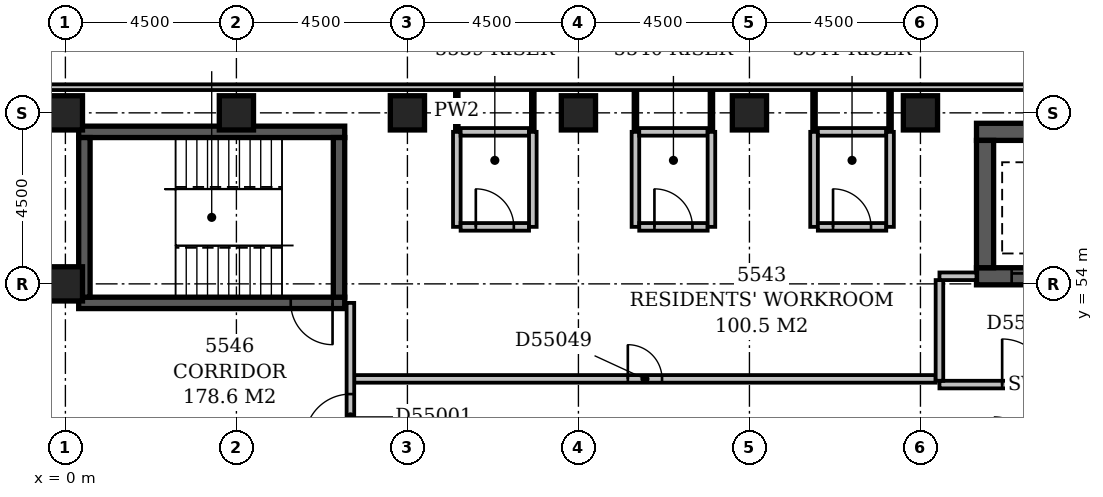
"""IFC4 building model, lengths in metres.
Left out: names, types, materials, properties, quantities, classifications, styles, units other than length and angle.
Written with IfcOpenShell. Run it as: python <this file> out.ifc"""

import sys

from ifc_helpers import new_model, si_unit, direction, frame, frame_2d, origin, origin_2d, place, context, subcontext, project, spatial, rectangle, extrude, element, fill, save


model = new_model("IFC4")
c1 = context("Model", 3, precision=1e-05, world=origin(), true_north=direction((0.0, 1.0)))
c2 = subcontext(c1, "Body", "Model", "MODEL_VIEW")
j1 = project(units=[si_unit("LENGTHUNIT", "METRE"), si_unit("PLANEANGLEUNIT", "RADIAN")], contexts=[c1])
p1 = place(None, origin())
s1 = spatial("IfcSite", under=j1, at=p1, CompositionType="ELEMENT")
p2 = place(p1, origin())
s2 = spatial("IfcBuilding", under=s1, at=p2, CompositionType="ELEMENT")
p3 = place(p2, frame((0.0, 0.0, 215.0)))
s3 = spatial("IfcBuildingStorey", under=s2, at=p3, CompositionType="ELEMENT", Elevation=215.0)
p4 = place(p3, frame((0.35, 53.5, -0.3), z_axis=(0.0, 0.0, 1.0), x_axis=(1.0, 0.0, 0.0)))
e1 = element("IfcWall", 1, at=p4, inside=s3, PredefinedType="SHEAR", context=c2, shape_type="SweptSolid", body=[
    extrude(rectangle(XDim=7.0, YDim=0.3, at=frame_2d((3.5, 0.0))), origin(), (0.0, 0.0, 1.0), 3.6),
])
p5 = place(p4, frame((5.58, 0.0, 0.3)))
e2 = element("IfcOpeningElement", 2, at=p5, cuts=e1, PredefinedType="OPENING", context=c2, shape_type="SweptSolid", body=[
    extrude(rectangle(XDim=1.1, YDim=2.1, at=frame_2d((0.55, 1.05))), frame((0.0, 0.162, 0.0), z_axis=(0.0, -1.0, 0.0), x_axis=(1.0, 0.0, 0.0)), (0.0, 0.0, 1.0), 0.324),
])
p6 = place(p3, frame((0.35, 58.0, -0.3), z_axis=(0.0, 0.0, 1.0), x_axis=(1.0, 0.0, 0.0)))
e3 = element("IfcWall", 3, at=p6, inside=s3, PredefinedType="SHEAR", context=c2, shape_type="SweptSolid", body=[
    extrude(rectangle(XDim=7.0, YDim=0.3, at=frame_2d((3.5, 0.0))), origin(), (0.0, 0.0, 1.0), 3.6),
])
for number, where, z_axis, x_axis in (
    (4, (0.5, 53.65, -0.3), (0.0, 0.0, 1.0), (0.0, 1.0, 0.0)),
    (5, (7.2, 53.65, -0.3), (0.0, 0.0, 1.0), (0.0, 1.0, 0.0)),
):
    element("IfcWall", number, at=place(p3, frame(where, z_axis=z_axis, x_axis=x_axis)), inside=s3, PredefinedType="SHEAR", context=c2, shape_type="SweptSolid", body=[
        extrude(rectangle(XDim=4.2, YDim=0.3, at=frame_2d((2.1, 0.0))), origin(), (0.0, 0.0, 1.0), 3.6),
    ])
p7 = place(p3, frame((23.975, 54.2, -0.3), z_axis=(0.0, 0.0, 1.0), x_axis=(1.0, 0.0, 0.0)))
e6 = element("IfcWall", 6, at=p7, inside=s3, PredefinedType="SHEAR", context=c2, shape_type="SweptSolid", body=[
    extrude(rectangle(XDim=2.95, YDim=0.45, at=frame_2d((1.475, 0.0))), origin(), (0.0, 0.0, 1.0), 3.6),
])
p8 = place(p7, frame((0.925, 0.0, 0.3)))
e7 = element("IfcOpeningElement", 7, at=p8, cuts=e6, PredefinedType="OPENING", context=c2, shape_type="SweptSolid", body=[
    extrude(rectangle(XDim=1.1, YDim=2.1, at=frame_2d((0.55, 1.05))), frame((0.0, 0.237, 0.0), z_axis=(0.0, -1.0, 0.0), x_axis=(1.0, 0.0, 0.0)), (0.0, 0.0, 1.0), 0.474),
])
p9 = place(p3, frame((23.975, 58.0, -0.3), z_axis=(0.0, 0.0, 1.0), x_axis=(1.0, 0.0, 0.0)))
e8 = element("IfcWall", 8, at=p9, inside=s3, PredefinedType="SHEAR", context=c2, shape_type="SweptSolid", body=[
    extrude(rectangle(XDim=2.95, YDim=0.45, at=frame_2d((1.475, 0.0))), origin(), (0.0, 0.0, 1.0), 3.6),
])
p10 = place(p3, frame((24.2, 54.425, -0.3), z_axis=(0.0, 0.0, 1.0), x_axis=(0.0, 1.0, 0.0)))
e9 = element("IfcWall", 9, at=p10, inside=s3, PredefinedType="SHEAR", context=c2, shape_type="SweptSolid", body=[
    extrude(rectangle(XDim=3.35, YDim=0.45, at=frame_2d((1.675, 0.0))), origin(), (0.0, 0.0, 1.0), 3.6),
])
for number, where, z_axis, x_axis in (
    (10, (0.0, 54.0, -0.3), (0.0, 0.0, 1.0), (1.0, 0.0, 0.0)),
    (11, (0.0, 58.5, -0.3), (0.0, 0.0, 1.0), (1.0, 0.0, 0.0)),
    (12, (4.5, 58.5, -0.3), (0.0, 0.0, 1.0), (1.0, 0.0, 0.0)),
    (13, (9.0, 58.5, -0.3), (0.0, 0.0, 1.0), (1.0, 0.0, 0.0)),
    (14, (13.5, 58.5, -0.3), (0.0, 0.0, 1.0), (1.0, 0.0, 0.0)),
    (15, (18.0, 58.5, -0.3), (0.0, 0.0, 1.0), (1.0, 0.0, 0.0)),
    (16, (22.5, 58.5, -0.3), (0.0, 0.0, 1.0), (1.0, 0.0, 0.0)),
):
    element("IfcColumn", number, at=place(p3, frame(where, z_axis=z_axis, x_axis=x_axis)), inside=s3, PredefinedType="COLUMN", context=c2, shape_type="SweptSolid", body=[
        extrude(rectangle(XDim=0.9, YDim=0.9, at=origin_2d()), origin(), (0.0, 0.0, 1.0), 3.6),
    ])
p11 = place(p3, frame((50.1, 59.175, 0.0), z_axis=(0.0, 0.0, 1.0), x_axis=(-1.0, 0.0, 0.0)))
e17 = element("IfcWall", 17, at=p11, inside=s3, PredefinedType="STANDARD", context=c2, shape_type="SweptSolid", body=[
    extrude(rectangle(XDim=50.85, YDim=0.15, at=frame_2d((25.425, 0.0))), origin(), (0.0, 0.0, 1.0), 2.7),
])
p12 = place(p11, frame((19.65, 0.0, 0.6)))
e18 = element("IfcOpeningElement", 18, at=p12, cuts=e17, PredefinedType="OPENING", context=c2, shape_type="SweptSolid", body=[
    extrude(rectangle(XDim=2.4, YDim=1.8, at=frame_2d((1.2, 0.9))), frame((0.0, 0.087, 0.0), z_axis=(0.0, -1.0, 0.0), x_axis=(1.0, 0.0, 0.0)), (0.0, 0.0, 1.0), 0.174),
])
p13 = place(p3, frame((23.0, 51.35, 0.0), z_axis=(0.0, 0.0, 1.0), x_axis=(1.0, 0.0, 0.0)))
e19 = element("IfcWall", 19, at=p13, inside=s3, PredefinedType="PARTITIONING", context=c2, shape_type="SweptSolid", body=[
    extrude(rectangle(XDim=4.8, YDim=0.2, at=frame_2d((2.4, 0.0))), origin(), (0.0, 0.0, 1.0), 3.3),
])
p14 = place(p13, frame((1.65, 0.0, 0.0)))
e20 = element("IfcOpeningElement", 20, at=p14, cuts=e19, PredefinedType="OPENING", context=c2, shape_type="SweptSolid", body=[
    extrude(rectangle(XDim=1.2, YDim=2.1, at=frame_2d((0.6, 1.05))), frame((0.0, 0.112, 0.0), z_axis=(0.0, -1.0, 0.0), x_axis=(1.0, 0.0, 0.0)), (0.0, 0.0, 1.0), 0.224),
])
p15 = place(p3, frame((23.0, 54.2, 0.0), z_axis=(0.0, 0.0, 1.0), x_axis=(1.0, 0.0, 0.0)))
e21 = element("IfcWall", 21, at=p15, inside=s3, PredefinedType="PARTITIONING", context=c2, shape_type="SweptSolid", body=[
    extrude(rectangle(XDim=0.975, YDim=0.2, at=frame_2d((0.488, 0.0))), origin(), (0.0, 0.0, 1.0), 3.3),
])
p16 = place(p3, frame((23.0, 51.45, 0.0), z_axis=(0.0, 0.0, 1.0), x_axis=(0.0, 1.0, 0.0)))
e22 = element("IfcWall", 22, at=p16, inside=s3, PredefinedType="PARTITIONING", context=c2, shape_type="SweptSolid", body=[
    extrude(rectangle(XDim=2.65, YDim=0.2, at=frame_2d((1.325, 0.0))), origin(), (0.0, 0.0, 1.0), 3.3),
])
p17 = place(p3, frame((7.5, 49.6, 0.0), z_axis=(0.0, 0.0, 1.0), x_axis=(0.0, 1.0, 0.0)))
e23 = element("IfcWall", 23, at=p17, inside=s3, PredefinedType="PARTITIONING", context=c2, shape_type="SweptSolid", body=[
    extrude(rectangle(XDim=3.9, YDim=0.2, at=frame_2d((1.95, 0.0))), origin(), (0.0, 0.0, 1.0), 3.3),
])
p18 = place(p17, frame((0.3, 0.0, 0.0)))
e24 = element("IfcOpeningElement", 24, at=p18, cuts=e23, PredefinedType="OPENING", context=c2, shape_type="SweptSolid", body=[
    extrude(rectangle(XDim=1.2, YDim=2.1, at=frame_2d((0.6, 1.05))), frame((0.0, 0.112, 0.0), z_axis=(0.0, -1.0, 0.0), x_axis=(1.0, 0.0, 0.0)), (0.0, 0.0, 1.0), 0.224),
])
p19 = place(p3, frame((7.6, 51.5, 0.0), z_axis=(0.0, 0.0, 1.0), x_axis=(1.0, 0.0, 0.0)))
e25 = element("IfcWall", 25, at=p19, inside=s3, PredefinedType="PARTITIONING", context=c2, shape_type="SweptSolid", body=[
    extrude(rectangle(XDim=15.3, YDim=0.2, at=frame_2d((7.65, 0.0))), origin(), (0.0, 0.0, 1.0), 3.3),
])
p20 = place(p19, frame((7.2, 0.0, 0.0)))
e26 = element("IfcOpeningElement", 26, at=p20, cuts=e25, PredefinedType="OPENING", context=c2, shape_type="SweptSolid", body=[
    extrude(rectangle(XDim=0.9, YDim=2.1, at=frame_2d((0.45, 1.05))), frame((0.0, 0.112, 0.0), z_axis=(0.0, -1.0, 0.0), x_axis=(1.0, 0.0, 0.0)), (0.0, 0.0, 1.0), 0.224),
])
p21 = place(p3, frame((10.3, 55.5, 0.0), z_axis=(0.0, 0.0, 1.0), x_axis=(0.0, 1.0, 0.0)))
e27 = element("IfcWall", 27, at=p21, inside=s3, PredefinedType="PARTITIONING", context=c2, shape_type="SweptSolid", body=[
    extrude(rectangle(XDim=2.5, YDim=0.2, at=frame_2d((1.25, 0.0))), origin(), (0.0, 0.0, 1.0), 3.3),
])
p22 = place(p3, frame((10.4, 55.5, 0.0), z_axis=(0.0, 0.0, 1.0), x_axis=(1.0, 0.0, 0.0)))
e28 = element("IfcWall", 28, at=p22, inside=s3, PredefinedType="PARTITIONING", context=c2, shape_type="SweptSolid", body=[
    extrude(rectangle(XDim=1.8, YDim=0.2, at=frame_2d((0.9, 0.0))), origin(), (0.0, 0.0, 1.0), 3.3),
])
p23 = place(p22, frame((0.4, 0.0, 0.0)))
e29 = element("IfcOpeningElement", 29, at=p23, cuts=e28, PredefinedType="OPENING", context=c2, shape_type="SweptSolid", body=[
    extrude(rectangle(XDim=1.0, YDim=2.1, at=frame_2d((0.5, 1.05))), frame((0.0, 0.112, 0.0), z_axis=(0.0, -1.0, 0.0), x_axis=(1.0, 0.0, 0.0)), (0.0, 0.0, 1.0), 0.224),
])
for number, where, z_axis, x_axis in (
    (30, (12.3, 55.5, 0.0), (0.0, 0.0, 1.0), (0.0, 1.0, 0.0)),
    (31, (15.0, 55.5, 0.0), (0.0, 0.0, 1.0), (0.0, 1.0, 0.0)),
):
    element("IfcWall", number, at=place(p3, frame(where, z_axis=z_axis, x_axis=x_axis)), inside=s3, PredefinedType="PARTITIONING", context=c2, shape_type="SweptSolid", body=[
        extrude(rectangle(XDim=2.5, YDim=0.2, at=frame_2d((1.25, 0.0))), origin(), (0.0, 0.0, 1.0), 3.3),
    ])
p24 = place(p3, frame((15.1, 55.5, 0.0), z_axis=(0.0, 0.0, 1.0), x_axis=(1.0, 0.0, 0.0)))
e32 = element("IfcWall", 32, at=p24, inside=s3, PredefinedType="PARTITIONING", context=c2, shape_type="SweptSolid", body=[
    extrude(rectangle(XDim=1.8, YDim=0.2, at=frame_2d((0.9, 0.0))), origin(), (0.0, 0.0, 1.0), 3.3),
])
p25 = place(p24, frame((0.4, 0.0, 0.0)))
e33 = element("IfcOpeningElement", 33, at=p25, cuts=e32, PredefinedType="OPENING", context=c2, shape_type="SweptSolid", body=[
    extrude(rectangle(XDim=1.0, YDim=2.1, at=frame_2d((0.5, 1.05))), frame((0.0, 0.112, 0.0), z_axis=(0.0, -1.0, 0.0), x_axis=(1.0, 0.0, 0.0)), (0.0, 0.0, 1.0), 0.224),
])
for number, where, z_axis, x_axis in (
    (34, (17.0, 55.5, 0.0), (0.0, 0.0, 1.0), (0.0, 1.0, 0.0)),
    (35, (19.7, 55.5, 0.0), (0.0, 0.0, 1.0), (0.0, 1.0, 0.0)),
):
    element("IfcWall", number, at=place(p3, frame(where, z_axis=z_axis, x_axis=x_axis)), inside=s3, PredefinedType="PARTITIONING", context=c2, shape_type="SweptSolid", body=[
        extrude(rectangle(XDim=2.5, YDim=0.2, at=frame_2d((1.25, 0.0))), origin(), (0.0, 0.0, 1.0), 3.3),
    ])
p26 = place(p3, frame((19.8, 55.5, 0.0), z_axis=(0.0, 0.0, 1.0), x_axis=(1.0, 0.0, 0.0)))
e36 = element("IfcWall", 36, at=p26, inside=s3, PredefinedType="PARTITIONING", context=c2, shape_type="SweptSolid", body=[
    extrude(rectangle(XDim=1.8, YDim=0.2, at=frame_2d((0.9, 0.0))), origin(), (0.0, 0.0, 1.0), 3.3),
])
p27 = place(p26, frame((0.4, 0.0, 0.0)))
e37 = element("IfcOpeningElement", 37, at=p27, cuts=e36, PredefinedType="OPENING", context=c2, shape_type="SweptSolid", body=[
    extrude(rectangle(XDim=1.0, YDim=2.1, at=frame_2d((0.5, 1.05))), frame((0.0, 0.112, 0.0), z_axis=(0.0, -1.0, 0.0), x_axis=(1.0, 0.0, 0.0)), (0.0, 0.0, 1.0), 0.224),
])
p28 = place(p3, frame((21.7, 55.5, 0.0), z_axis=(0.0, 0.0, 1.0), x_axis=(0.0, 1.0, 0.0)))
e38 = element("IfcWall", 38, at=p28, inside=s3, PredefinedType="PARTITIONING", context=c2, shape_type="SweptSolid", body=[
    extrude(rectangle(XDim=2.5, YDim=0.2, at=frame_2d((1.25, 0.0))), origin(), (0.0, 0.0, 1.0), 3.3),
])
p29 = place(p3, frame((10.3, 58.0, 0.0), z_axis=(0.0, 0.0, 1.0), x_axis=(0.0, 1.0, 0.0)))
e39 = element("IfcWall", 39, at=p29, inside=s3, PredefinedType="PARTITIONING", context=c2, shape_type="SweptSolid", body=[
    extrude(rectangle(XDim=1.1, YDim=0.1, at=frame_2d((0.55, 0.0))), origin(), (0.0, 0.0, 1.0), 3.3),
])
p30 = place(p3, frame((10.4, 58.0, 0.0), z_axis=(0.0, 0.0, 1.0), x_axis=(1.0, 0.0, 0.0)))
e40 = element("IfcWall", 40, at=p30, inside=s3, PredefinedType="PARTITIONING", context=c2, shape_type="SweptSolid", body=[
    extrude(rectangle(XDim=1.8, YDim=0.2, at=frame_2d((0.9, 0.0))), origin(), (0.0, 0.0, 1.0), 3.3),
])
for number, where, z_axis, x_axis in (
    (41, (12.3, 58.0, 0.0), (0.0, 0.0, 1.0), (0.0, 1.0, 0.0)),
    (42, (15.0, 58.0, 0.0), (0.0, 0.0, 1.0), (0.0, 1.0, 0.0)),
):
    element("IfcWall", number, at=place(p3, frame(where, z_axis=z_axis, x_axis=x_axis)), inside=s3, PredefinedType="PARTITIONING", context=c2, shape_type="SweptSolid", body=[
        extrude(rectangle(XDim=1.1, YDim=0.1, at=frame_2d((0.55, 0.0))), origin(), (0.0, 0.0, 1.0), 3.3),
    ])
p31 = place(p3, frame((15.1, 58.0, 0.0), z_axis=(0.0, 0.0, 1.0), x_axis=(1.0, 0.0, 0.0)))
e43 = element("IfcWall", 43, at=p31, inside=s3, PredefinedType="PARTITIONING", context=c2, shape_type="SweptSolid", body=[
    extrude(rectangle(XDim=1.8, YDim=0.2, at=frame_2d((0.9, 0.0))), origin(), (0.0, 0.0, 1.0), 3.3),
])
for number, where, z_axis, x_axis in (
    (44, (17.0, 58.0, 0.0), (0.0, 0.0, 1.0), (0.0, 1.0, 0.0)),
    (45, (19.7, 58.0, 0.0), (0.0, 0.0, 1.0), (0.0, 1.0, 0.0)),
):
    element("IfcWall", number, at=place(p3, frame(where, z_axis=z_axis, x_axis=x_axis)), inside=s3, PredefinedType="PARTITIONING", context=c2, shape_type="SweptSolid", body=[
        extrude(rectangle(XDim=1.1, YDim=0.1, at=frame_2d((0.55, 0.0))), origin(), (0.0, 0.0, 1.0), 3.3),
    ])
p32 = place(p3, frame((19.8, 58.0, 0.0), z_axis=(0.0, 0.0, 1.0), x_axis=(1.0, 0.0, 0.0)))
e46 = element("IfcWall", 46, at=p32, inside=s3, PredefinedType="PARTITIONING", context=c2, shape_type="SweptSolid", body=[
    extrude(rectangle(XDim=1.8, YDim=0.2, at=frame_2d((0.9, 0.0))), origin(), (0.0, 0.0, 1.0), 3.3),
])
p33 = place(p3, frame((21.7, 58.0, 0.0), z_axis=(0.0, 0.0, 1.0), x_axis=(0.0, 1.0, 0.0)))
e47 = element("IfcWall", 47, at=p33, inside=s3, PredefinedType="PARTITIONING", context=c2, shape_type="SweptSolid", body=[
    extrude(rectangle(XDim=1.1, YDim=0.1, at=frame_2d((0.55, 0.0))), origin(), (0.0, 0.0, 1.0), 3.3),
])
p34 = place(p18, origin())
e48 = element("IfcDoor", 48, at=p34, inside=s3, OperationType="SINGLE_SWING_LEFT", PredefinedType="DOOR", context=c2, shape_type="SweptSolid", body=[
    extrude(rectangle(XDim=1.2, YDim=2.1, at=frame_2d((0.6, 1.05))), frame((0.0, 0.025, 0.0), z_axis=(0.0, -1.0, 0.0), x_axis=(1.0, 0.0, 0.0)), (0.0, 0.0, 1.0), 0.05),
])
fill(e24, e48)
p35 = place(p14, origin())
e49 = element("IfcDoor", 49, at=p35, inside=s3, OperationType="SINGLE_SWING_LEFT", PredefinedType="DOOR", context=c2, shape_type="SweptSolid", body=[
    extrude(rectangle(XDim=1.2, YDim=2.1, at=frame_2d((0.6, 1.05))), frame((0.0, 0.025, 0.0), z_axis=(0.0, -1.0, 0.0), x_axis=(1.0, 0.0, 0.0)), (0.0, 0.0, 1.0), 0.05),
])
fill(e20, e49)
p36 = place(p8, origin())
e50 = element("IfcDoor", 50, at=p36, inside=s3, OperationType="SLIDING_TO_LEFT", PredefinedType="DOOR", context=c2, shape_type="SweptSolid", body=[
    extrude(rectangle(XDim=1.1, YDim=2.1, at=frame_2d((0.55, 1.05))), frame((0.0, 0.025, 0.0), z_axis=(0.0, -1.0, 0.0), x_axis=(1.0, 0.0, 0.0)), (0.0, 0.0, 1.0), 0.05),
])
fill(e7, e50)
p37 = place(p5, origin())
e51 = element("IfcDoor", 51, at=p37, inside=s3, OperationType="SINGLE_SWING_RIGHT", PredefinedType="DOOR", context=c2, shape_type="SweptSolid", body=[
    extrude(rectangle(XDim=1.1, YDim=2.1, at=frame_2d((0.55, 1.05))), frame((0.0, 0.025, 0.0), z_axis=(0.0, -1.0, 0.0), x_axis=(1.0, 0.0, 0.0)), (0.0, 0.0, 1.0), 0.05),
])
fill(e2, e51)
p38 = place(p20, origin())
e52 = element("IfcDoor", 52, at=p38, inside=s3, OperationType="SINGLE_SWING_LEFT", PredefinedType="DOOR", context=c2, shape_type="SweptSolid", body=[
    extrude(rectangle(XDim=0.9, YDim=2.1, at=frame_2d((0.45, 1.05))), frame((0.0, 0.025, 0.0), z_axis=(0.0, -1.0, 0.0), x_axis=(1.0, 0.0, 0.0)), (0.0, 0.0, 1.0), 0.05),
])
fill(e26, e52)
p39 = place(p23, origin())
e53 = element("IfcDoor", 53, at=p39, inside=s3, OperationType="SINGLE_SWING_LEFT", PredefinedType="DOOR", context=c2, shape_type="SweptSolid", body=[
    extrude(rectangle(XDim=1.0, YDim=2.1, at=frame_2d((0.5, 1.05))), frame((0.0, 0.025, 0.0), z_axis=(0.0, -1.0, 0.0), x_axis=(1.0, 0.0, 0.0)), (0.0, 0.0, 1.0), 0.05),
])
fill(e29, e53)
p40 = place(p25, origin())
e54 = element("IfcDoor", 54, at=p40, inside=s3, OperationType="SINGLE_SWING_LEFT", PredefinedType="DOOR", context=c2, shape_type="SweptSolid", body=[
    extrude(rectangle(XDim=1.0, YDim=2.1, at=frame_2d((0.5, 1.05))), frame((0.0, 0.025, 0.0), z_axis=(0.0, -1.0, 0.0), x_axis=(1.0, 0.0, 0.0)), (0.0, 0.0, 1.0), 0.05),
])
fill(e33, e54)
p41 = place(p27, origin())
e55 = element("IfcDoor", 55, at=p41, inside=s3, OperationType="SINGLE_SWING_LEFT", PredefinedType="DOOR", context=c2, shape_type="SweptSolid", body=[
    extrude(rectangle(XDim=1.0, YDim=2.1, at=frame_2d((0.5, 1.05))), frame((0.0, 0.025, 0.0), z_axis=(0.0, -1.0, 0.0), x_axis=(1.0, 0.0, 0.0)), (0.0, 0.0, 1.0), 0.05),
])
fill(e37, e55)
save(model, sys.argv[1])
